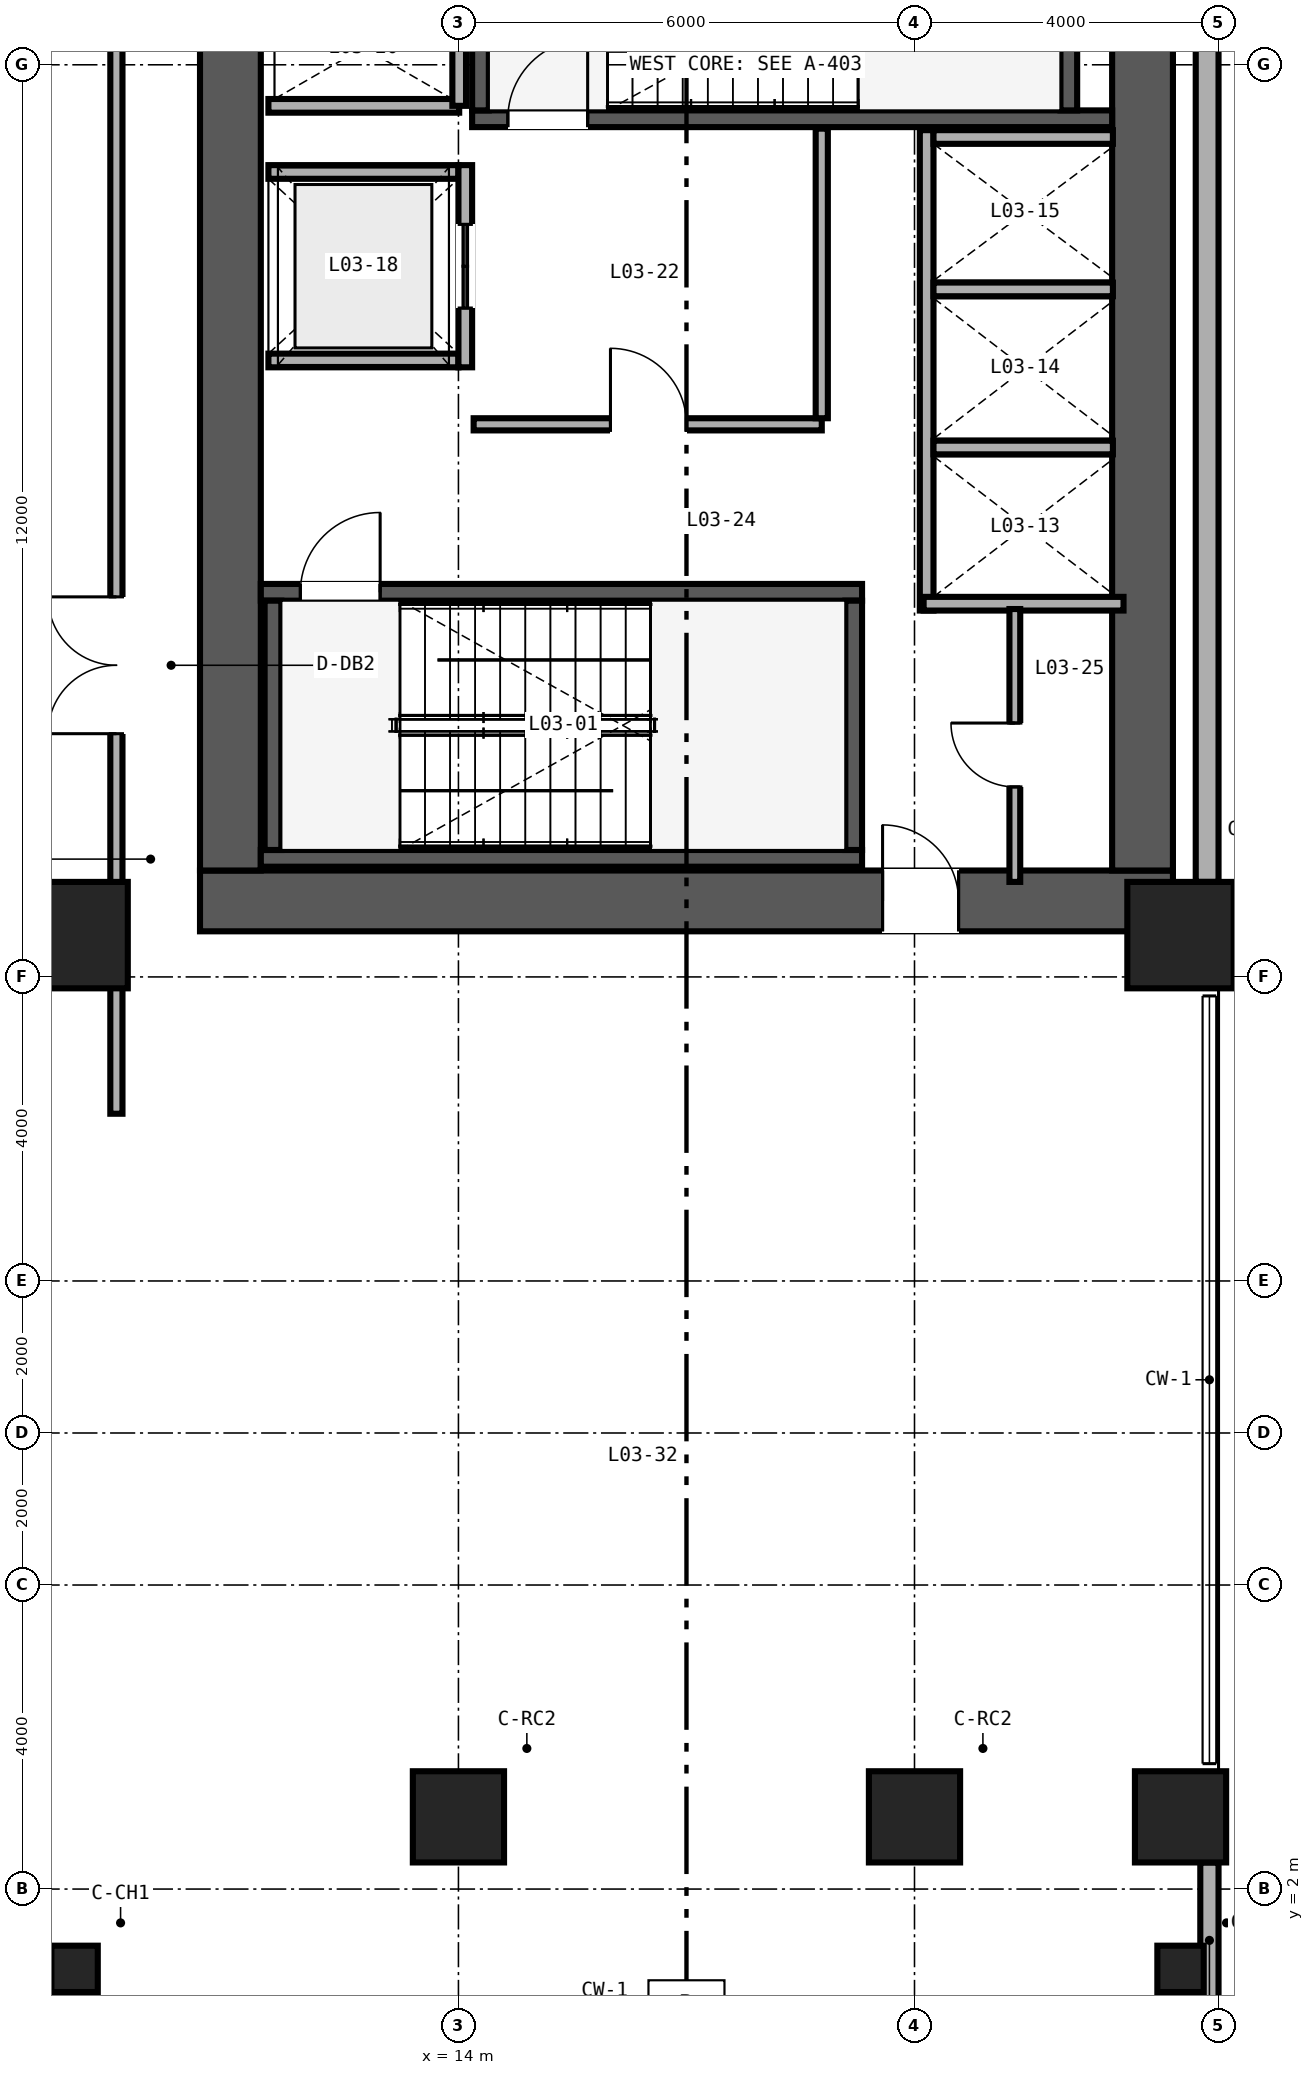
"""IFC4 building model, lengths in metres.
Left out: names, types, materials, properties, quantities, classifications, styles, units other than length and angle.
Written with IfcOpenShell. Run it as: python <this file> out.ifc"""

import sys

from ifc_helpers import new_model, si_unit, direction, frame, frame_2d, origin, origin_2d, place, context, subcontext, project, spatial, rectangle, hollow_circle, extrude, source, transform, mapped, element, fill, save


model = new_model("IFC4")
c1 = context("Model", 3, precision=1e-05, world=origin(), true_north=direction((0.0, 1.0)))
c2 = subcontext(c1, "Body", "Model", "MODEL_VIEW")
j1 = project(units=[si_unit("LENGTHUNIT", "METRE"), si_unit("PLANEANGLEUNIT", "RADIAN")], contexts=[c1])
p1 = place(None, origin())
s1 = spatial("IfcSite", under=j1, at=p1, CompositionType="ELEMENT")
p2 = place(p1, origin())
s2 = spatial("IfcBuilding", under=s1, at=p2, CompositionType="ELEMENT")
p3 = place(p2, frame((0.0, 0.0, 11.4)))
s3 = spatial("IfcBuildingStorey", under=s2, at=p3, CompositionType="ELEMENT", Elevation=11.4)
p4 = place(p3, frame((10.6, 15.0, 0.0), z_axis=(0.0, 0.0, 1.0), x_axis=(1.0, 0.0, 0.0)))
e1 = element("IfcWall", 1, at=p4, inside=s3, PredefinedType="SHEAR", context=c2, shape_type="SweptSolid", body=[
    extrude(rectangle(XDim=12.8, YDim=0.8, at=frame_2d((6.4, 0.0))), origin(), (0.0, 0.0, 1.0), 7.51),
])
p5 = place(p4, frame((8.98, 0.0, 0.0)))
e2 = element("IfcOpeningElement", 2, at=p5, cuts=e1, PredefinedType="OPENING", context=c2, shape_type="SweptSolid", body=[
    extrude(rectangle(XDim=1.0, YDim=2.15, at=frame_2d((0.5, 1.075))), frame((0.0, 0.41, 0.0), z_axis=(0.0, -1.0, 0.0), x_axis=(1.0, 0.0, 0.0)), (0.0, 0.0, 1.0), 0.82),
])
for number, where, z_axis, x_axis in (
    (3, (11.0, 15.4, 0.0), (0.0, 0.0, 1.0), (0.0, 1.0, 0.0)),
    (4, (23.0, 15.4, 0.0), (0.0, 0.0, 1.0), (0.0, 1.0, 0.0)),
):
    element("IfcWall", number, at=place(p3, frame(where, z_axis=z_axis, x_axis=x_axis)), inside=s3, PredefinedType="SHEAR", context=c2, shape_type="SweptSolid", body=[
        extrude(rectangle(XDim=21.2, YDim=0.8, at=frame_2d((10.6, 0.0))), origin(), (0.0, 0.0, 1.0), 7.51),
    ])
p6 = place(p3, frame((11.4, 15.56, 0.0), z_axis=(0.0, 0.0, 1.0), x_axis=(1.0, 0.0, 0.0)))
e5 = element("IfcWall", 5, at=p6, inside=s3, PredefinedType="SHEAR", context=c2, shape_type="SweptSolid", body=[
    extrude(rectangle(XDim=7.91, YDim=0.22, at=frame_2d((3.955, 0.0))), origin(), (0.0, 0.0, 1.0), 7.6),
])
p7 = place(p3, frame((11.4, 19.06, 0.0), z_axis=(0.0, 0.0, 1.0), x_axis=(1.0, 0.0, 0.0)))
e6 = element("IfcWall", 6, at=p7, inside=s3, PredefinedType="SHEAR", context=c2, shape_type="SweptSolid", body=[
    extrude(rectangle(XDim=7.91, YDim=0.22, at=frame_2d((3.955, 0.0))), origin(), (0.0, 0.0, 1.0), 7.6),
])
p8 = place(p7, frame((0.52, 0.0, 0.0)))
e7 = element("IfcOpeningElement", 7, at=p8, cuts=e6, PredefinedType="OPENING", context=c2, shape_type="SweptSolid", body=[
    extrude(rectangle(XDim=1.05, YDim=2.15, at=frame_2d((0.525, 1.075))), frame((0.0, 0.12, 0.0), z_axis=(0.0, -1.0, 0.0), x_axis=(1.0, 0.0, 0.0)), (0.0, 0.0, 1.0), 0.24),
])
for number, where, z_axis, x_axis in (
    (8, (11.56, 15.67, 0.0), (0.0, 0.0, 1.0), (0.0, 1.0, 0.0)),
    (9, (19.2, 15.67, 0.0), (0.0, 0.0, 1.0), (0.0, 1.0, 0.0)),
):
    element("IfcWall", number, at=place(p3, frame(where, z_axis=z_axis, x_axis=x_axis)), inside=s3, PredefinedType="SHEAR", context=c2, shape_type="SweptSolid", body=[
        extrude(rectangle(XDim=3.28, YDim=0.22, at=frame_2d((1.64, 0.0))), origin(), (0.0, 0.0, 1.0), 7.6),
    ])
p9 = place(p3, frame((14.18, 25.29, 0.0), z_axis=(0.0, 0.0, 1.0), x_axis=(1.0, 0.0, 0.0)))
e10 = element("IfcWall", 10, at=p9, inside=s3, PredefinedType="SHEAR", context=c2, shape_type="SweptSolid", body=[
    extrude(rectangle(XDim=8.42, YDim=0.22, at=frame_2d((4.21, 0.0))), origin(), (0.0, 0.0, 1.0), 7.6),
])
p10 = place(p9, frame((0.47, 0.0, 0.0)))
e11 = element("IfcOpeningElement", 11, at=p10, cuts=e10, PredefinedType="OPENING", context=c2, shape_type="SweptSolid", body=[
    extrude(rectangle(XDim=1.05, YDim=2.15, at=frame_2d((0.525, 1.075))), frame((0.0, 0.12, 0.0), z_axis=(0.0, -1.0, 0.0), x_axis=(1.0, 0.0, 0.0)), (0.0, 0.0, 1.0), 0.24),
])
for number, where, z_axis, x_axis in (
    (12, (14.29, 25.4, 0.0), (0.0, 0.0, 1.0), (0.0, 1.0, 0.0)),
    (13, (22.03, 25.4, 0.0), (0.0, 0.0, 1.0), (0.0, 1.0, 0.0)),
):
    element("IfcWall", number, at=place(p3, frame(where, z_axis=z_axis, x_axis=x_axis)), inside=s3, PredefinedType="SHEAR", context=c2, shape_type="SweptSolid", body=[
        extrude(rectangle(XDim=3.28, YDim=0.22, at=frame_2d((1.64, 0.0))), origin(), (0.0, 0.0, 1.0), 7.6),
    ])
m1 = source(origin(), c2, "Body", "SweptSolid", [
    extrude(hollow_circle(Radius=0.305, WallThickness=0.025, at=origin_2d()), origin(), (0.0, 0.0, 1.0), 7.51),
])
for number, where, z_axis, x_axis in (
    (14, (8.95, 0.95, 0.0), (0.0, 0.0, 1.0), (1.0, 0.0, 0.0)),
    (15, (23.5, 0.95, 0.0), (0.0, 0.0, 1.0), (1.0, 0.0, 0.0)),
):
    element("IfcColumn", number, at=place(p3, frame(where, z_axis=z_axis, x_axis=x_axis)), inside=s3, PredefinedType="COLUMN", context=c2, shape_type="MappedRepresentation", body=[
        mapped(m1, transform((0.0, 0.0, 0.0), scale=1.0)),
    ])
m2 = source(origin(), c2, "Body", "SweptSolid", [
    extrude(rectangle(XDim=1.4, YDim=1.4, at=origin_2d()), origin(), (0.0, 0.0, 1.0), 7.51),
])
for number, where, z_axis, x_axis in (
    (16, (8.95, 14.55, 0.0), (0.0, 0.0, 1.0), (1.0, 0.0, 0.0)),
    (17, (23.5, 14.55, 0.0), (0.0, 0.0, 1.0), (1.0, 0.0, 0.0)),
):
    element("IfcColumn", number, at=place(p3, frame(where, z_axis=z_axis, x_axis=x_axis)), inside=s3, PredefinedType="COLUMN", context=c2, shape_type="MappedRepresentation", body=[
        mapped(m2, transform((0.0, 0.0, 0.0), scale=1.0)),
    ])
m3 = source(origin(), c2, "Body", "SweptSolid", [
    extrude(rectangle(XDim=1.2, YDim=1.2, at=origin_2d()), origin(), (0.0, 0.0, 1.0), 7.51),
])
for number, where, z_axis, x_axis in (
    (18, (14.0, 2.95, 0.0), (0.0, 0.0, 1.0), (1.0, 0.0, 0.0)),
    (19, (20.0, 2.95, 0.0), (0.0, 0.0, 1.0), (1.0, 0.0, 0.0)),
    (20, (23.5, 2.95, 0.0), (0.0, 0.0, 1.0), (1.0, 0.0, 0.0)),
):
    element("IfcColumn", number, at=place(p3, frame(where, z_axis=z_axis, x_axis=x_axis)), inside=s3, PredefinedType="COLUMN", context=c2, shape_type="MappedRepresentation", body=[
        mapped(m3, transform((0.0, 0.0, 0.0), scale=1.0)),
    ])
p11 = place(p3, frame((23.88, 0.3, 0.0), z_axis=(0.0, 0.0, 1.0), x_axis=(0.0, 1.0, 0.0)))
e21 = element("IfcWall", 21, at=p11, inside=s3, PredefinedType="SOLIDWALL", context=c2, shape_type="SweptSolid", body=[
    extrude(rectangle(XDim=2.05, YDim=0.24, at=frame_2d((1.025, 0.0))), origin(), (0.0, 0.0, 1.0), 6.583),
])
p12 = place(p3, frame((23.85, 15.25, 0.0), z_axis=(0.0, 0.0, 1.0), x_axis=(0.0, 1.0, 0.0)))
e22 = element("IfcWall", 22, at=p12, inside=s3, PredefinedType="SOLIDWALL", context=c2, shape_type="SweptSolid", body=[
    extrude(rectangle(XDim=12.2, YDim=0.3, at=frame_2d((6.1, 0.0))), origin(), (0.0, 0.0, 1.0), 6.731),
])
p13 = place(p3, frame((20.16, 18.82, 0.0), z_axis=(0.0, 0.0, 1.0), x_axis=(0.0, 1.0, 0.0)))
e23 = element("IfcWall", 23, at=p13, inside=s3, PredefinedType="SOLIDWALL", context=c2, shape_type="SweptSolid", body=[
    extrude(rectangle(XDim=6.32, YDim=0.18, at=frame_2d((3.16, 0.0))), origin(), (0.0, 0.0, 1.0), 6.41),
])
p14 = place(p3, frame((20.12, 18.91, 0.0), z_axis=(0.0, 0.0, 1.0), x_axis=(1.0, 0.0, 0.0)))
e24 = element("IfcWall", 24, at=p14, inside=s3, PredefinedType="SOLIDWALL", context=c2, shape_type="SweptSolid", body=[
    extrude(rectangle(XDim=2.63, YDim=0.18, at=frame_2d((1.315, 0.0))), origin(), (0.0, 0.0, 1.0), 7.51),
])
p15 = place(p3, frame((20.25, 25.05, 0.0), z_axis=(0.0, 0.0, 1.0), x_axis=(1.0, 0.0, 0.0)))
e25 = element("IfcWall", 25, at=p15, inside=s3, PredefinedType="SOLIDWALL", context=c2, shape_type="SweptSolid", body=[
    extrude(rectangle(XDim=2.36, YDim=0.18, at=frame_2d((1.18, 0.0))), origin(), (0.0, 0.0, 1.0), 7.51),
])
p16 = place(p3, frame((20.25, 20.965, 0.0), z_axis=(0.0, 0.0, 1.0), x_axis=(1.0, 0.0, 0.0)))
e26 = element("IfcWall", 26, at=p16, inside=s3, PredefinedType="SOLIDWALL", context=c2, shape_type="SweptSolid", body=[
    extrude(rectangle(XDim=2.36, YDim=0.18, at=frame_2d((1.18, 0.0))), origin(), (0.0, 0.0, 1.0), 6.41),
])
p17 = place(p3, frame((20.25, 23.045, 0.0), z_axis=(0.0, 0.0, 1.0), x_axis=(1.0, 0.0, 0.0)))
e27 = element("IfcWall", 27, at=p17, inside=s3, PredefinedType="SOLIDWALL", context=c2, shape_type="SweptSolid", body=[
    extrude(rectangle(XDim=2.36, YDim=0.18, at=frame_2d((1.18, 0.0))), origin(), (0.0, 0.0, 1.0), 7.51),
])
for number, where, z_axis, x_axis in (
    (28, (11.5, 22.11, 0.0), (0.0, 0.0, 1.0), (1.0, 0.0, 0.0)),
    (29, (11.5, 24.59, 0.0), (0.0, 0.0, 1.0), (1.0, 0.0, 0.0)),
):
    element("IfcWall", number, at=place(p3, frame(where, z_axis=z_axis, x_axis=x_axis)), inside=s3, PredefinedType="SOLIDWALL", context=c2, shape_type="SweptSolid", body=[
        extrude(rectangle(XDim=2.5, YDim=0.18, at=frame_2d((1.25, 0.0))), origin(), (0.0, 0.0, 1.0), 7.51),
    ])
p18 = place(p3, frame((14.09, 22.02, 0.0), z_axis=(0.0, 0.0, 1.0), x_axis=(0.0, 1.0, 0.0)))
e30 = element("IfcWall", 30, at=p18, inside=s3, PredefinedType="SOLIDWALL", context=c2, shape_type="SweptSolid", body=[
    extrude(rectangle(XDim=2.66, YDim=0.18, at=frame_2d((1.33, 0.0))), origin(), (0.0, 0.0, 1.0), 7.51),
])
p19 = place(p18, frame((0.78, 0.0, 0.0)))
e31 = element("IfcOpeningElement", 31, at=p19, cuts=e30, PredefinedType="OPENING", context=c2, shape_type="SweptSolid", body=[
    extrude(rectangle(XDim=1.1, YDim=2.2, at=frame_2d((0.55, 1.1))), frame((0.0, 0.1, 0.0), z_axis=(0.0, -1.0, 0.0), x_axis=(1.0, 0.0, 0.0)), (0.0, 0.0, 1.0), 0.2),
])
p20 = place(p3, frame((11.5, 25.46, 0.0), z_axis=(0.0, 0.0, 1.0), x_axis=(1.0, 0.0, 0.0)))
e32 = element("IfcWall", 32, at=p20, inside=s3, PredefinedType="SOLIDWALL", context=c2, shape_type="SweptSolid", body=[
    extrude(rectangle(XDim=2.51, YDim=0.18, at=frame_2d((1.255, 0.0))), origin(), (0.0, 0.0, 1.0), 7.51),
])
p21 = place(p3, frame((14.01, 25.46, 0.0), z_axis=(0.0, 0.0, 1.0), x_axis=(0.0, 1.0, 0.0)))
e33 = element("IfcWall", 33, at=p21, inside=s3, PredefinedType="SOLIDWALL", context=c2, shape_type="SweptSolid", body=[
    extrude(rectangle(XDim=3.08, YDim=0.18, at=frame_2d((1.54, 0.0))), origin(), (0.0, 0.0, 1.0), 7.51),
])
p22 = place(p3, frame((14.2, 21.27, 0.0), z_axis=(0.0, 0.0, 1.0), x_axis=(1.0, 0.0, 0.0)))
e34 = element("IfcWall", 34, at=p22, inside=s3, PredefinedType="PARTITIONING", context=c2, shape_type="SweptSolid", body=[
    extrude(rectangle(XDim=4.58, YDim=0.16, at=frame_2d((2.29, 0.0))), origin(), (0.0, 0.0, 1.0), 7.51),
])
p23 = place(p22, frame((1.8, 0.0, 0.0)))
e35 = element("IfcOpeningElement", 35, at=p23, cuts=e34, PredefinedType="OPENING", context=c2, shape_type="SweptSolid", body=[
    extrude(rectangle(XDim=1.0, YDim=2.15, at=frame_2d((0.5, 1.075))), frame((0.0, 0.09, 0.0), z_axis=(0.0, -1.0, 0.0), x_axis=(1.0, 0.0, 0.0)), (0.0, 0.0, 1.0), 0.18),
])
p24 = place(p3, frame((18.78, 21.35, 0.0), z_axis=(0.0, 0.0, 1.0), x_axis=(0.0, 1.0, 0.0)))
e36 = element("IfcWall", 36, at=p24, inside=s3, PredefinedType="PARTITIONING", context=c2, shape_type="SweptSolid", body=[
    extrude(rectangle(XDim=3.81, YDim=0.16, at=frame_2d((1.905, 0.0))), origin(), (0.0, 0.0, 1.0), 7.51),
])
p25 = place(p3, frame((21.32, 15.25, 0.0), z_axis=(0.0, 0.0, 1.0), x_axis=(0.0, 1.0, 0.0)))
e37 = element("IfcWall", 37, at=p25, inside=s3, PredefinedType="PARTITIONING", context=c2, shape_type="SweptSolid", body=[
    extrude(rectangle(XDim=3.59, YDim=0.142, at=frame_2d((1.795, 0.0))), origin(), (0.0, 0.0, 1.0), 7.51),
])
p26 = place(p25, frame((1.25, 0.0, 0.0)))
e38 = element("IfcOpeningElement", 38, at=p26, cuts=e37, PredefinedType="OPENING", context=c2, shape_type="SweptSolid", body=[
    extrude(rectangle(XDim=0.84, YDim=2.1, at=frame_2d((0.42, 1.05))), frame((0.0, 0.081, 0.0), z_axis=(0.0, -1.0, 0.0), x_axis=(1.0, 0.0, 0.0)), (0.0, 0.0, 1.0), 0.162),
])
p27 = place(p3, frame((9.5, 12.2, 0.0), z_axis=(0.0, 0.0, 1.0), x_axis=(0.0, 1.0, 0.0)))
e39 = element("IfcWall", 39, at=p27, inside=s3, PredefinedType="PARTITIONING", context=c2, shape_type="SweptSolid", body=[
    extrude(rectangle(XDim=31.6, YDim=0.16, at=frame_2d((15.8, 0.0))), origin(), (0.0, 0.0, 1.0), 6.583),
])
p28 = place(p27, frame((5.0, 0.0, 0.0)))
e40 = element("IfcOpeningElement", 40, at=p28, cuts=e39, PredefinedType="OPENING", context=c2, shape_type="SweptSolid", body=[
    extrude(rectangle(XDim=1.8, YDim=2.35, at=frame_2d((0.9, 1.175))), frame((0.0, 0.09, 0.0), z_axis=(0.0, -1.0, 0.0), x_axis=(1.0, 0.0, 0.0)), (0.0, 0.0, 1.0), 0.18),
])
p29 = place(p27, frame((27.15, 0.0, 0.0)))
e41 = element("IfcOpeningElement", 41, at=p29, cuts=e39, PredefinedType="OPENING", context=c2, shape_type="SweptSolid", body=[
    extrude(rectangle(XDim=1.8, YDim=2.35, at=frame_2d((0.9, 1.175))), frame((0.0, 0.09, 0.0), z_axis=(0.0, -1.0, 0.0), x_axis=(1.0, 0.0, 0.0)), (0.0, 0.0, 1.0), 0.18),
])
m4 = source(origin(), c2, "Body", "SweptSolid", [
    extrude(rectangle(XDim=1.05, YDim=2.15, at=frame_2d((0.525, 1.075))), frame((0.0, 0.025, 0.0), z_axis=(0.0, -1.0, 0.0), x_axis=(1.0, 0.0, 0.0)), (0.0, 0.0, 1.0), 0.05),
])
p30 = place(p8, origin())
e42 = element("IfcDoor", 42, at=p30, inside=s3, OperationType="SINGLE_SWING_RIGHT", PredefinedType="DOOR", context=c2, shape_type="MappedRepresentation", body=[
    mapped(m4, transform((0.0, 0.0, 0.0), scale=1.0)),
])
fill(e7, e42)
p31 = place(p10, origin())
e43 = element("IfcDoor", 43, at=p31, inside=s3, OperationType="SINGLE_SWING_RIGHT", PredefinedType="DOOR", context=c2, shape_type="MappedRepresentation", body=[
    mapped(m4, transform((0.0, 0.0, 0.0), scale=1.0)),
])
fill(e11, e43)
m5 = source(origin(), c2, "Body", "SweptSolid", [
    extrude(rectangle(XDim=1.1, YDim=2.2, at=frame_2d((0.55, 1.1))), frame((0.0, 0.025, 0.0), z_axis=(0.0, -1.0, 0.0), x_axis=(1.0, 0.0, 0.0)), (0.0, 0.0, 1.0), 0.05),
])
p32 = place(p19, origin())
e44 = element("IfcDoor", 44, at=p32, inside=s3, OperationType="DOUBLE_DOOR_SLIDING", PredefinedType="DOOR", context=c2, shape_type="MappedRepresentation", body=[
    mapped(m5, transform((0.0, 0.0, 0.0), scale=1.0)),
])
fill(e31, e44)
m6 = source(origin(), c2, "Body", "SweptSolid", [
    extrude(rectangle(XDim=1.0, YDim=2.15, at=frame_2d((0.5, 1.075))), frame((0.0, 0.025, 0.0), z_axis=(0.0, -1.0, 0.0), x_axis=(1.0, 0.0, 0.0)), (0.0, 0.0, 1.0), 0.05),
])
p33 = place(p23, origin())
e45 = element("IfcDoor", 45, at=p33, inside=s3, OperationType="SINGLE_SWING_LEFT", PredefinedType="DOOR", context=c2, shape_type="MappedRepresentation", body=[
    mapped(m6, transform((0.0, 0.0, 0.0), scale=1.0)),
])
fill(e35, e45)
m7 = source(origin(), c2, "Body", "SweptSolid", [
    extrude(rectangle(XDim=0.84, YDim=2.1, at=frame_2d((0.42, 1.05))), frame((0.0, 0.025, 0.0), z_axis=(0.0, -1.0, 0.0), x_axis=(1.0, 0.0, 0.0)), (0.0, 0.0, 1.0), 0.05),
])
p34 = place(p26, origin())
e46 = element("IfcDoor", 46, at=p34, inside=s3, OperationType="SINGLE_SWING_RIGHT", PredefinedType="DOOR", context=c2, shape_type="MappedRepresentation", body=[
    mapped(m7, transform((0.0, 0.0, 0.0), scale=1.0)),
])
fill(e38, e46)
p35 = place(p5, origin())
e47 = element("IfcDoor", 47, at=p35, inside=s3, OperationType="SINGLE_SWING_LEFT", PredefinedType="DOOR", context=c2, shape_type="MappedRepresentation", body=[
    mapped(m6, transform((0.0, 0.0, 0.0), scale=1.0)),
])
fill(e2, e47)
m8 = source(origin(), c2, "Body", "SweptSolid", [
    extrude(rectangle(XDim=1.8, YDim=2.35, at=frame_2d((0.9, 1.175))), frame((0.0, 0.025, 0.0), z_axis=(0.0, -1.0, 0.0), x_axis=(1.0, 0.0, 0.0)), (0.0, 0.0, 1.0), 0.05),
])
p36 = place(p28, origin())
e48 = element("IfcDoor", 48, at=p36, inside=s3, OperationType="DOUBLE_DOOR_SINGLE_SWING", PredefinedType="DOOR", context=c2, shape_type="MappedRepresentation", body=[
    mapped(m8, transform((0.0, 0.0, 0.0), scale=1.0)),
])
fill(e40, e48)
save(model, sys.argv[1])
